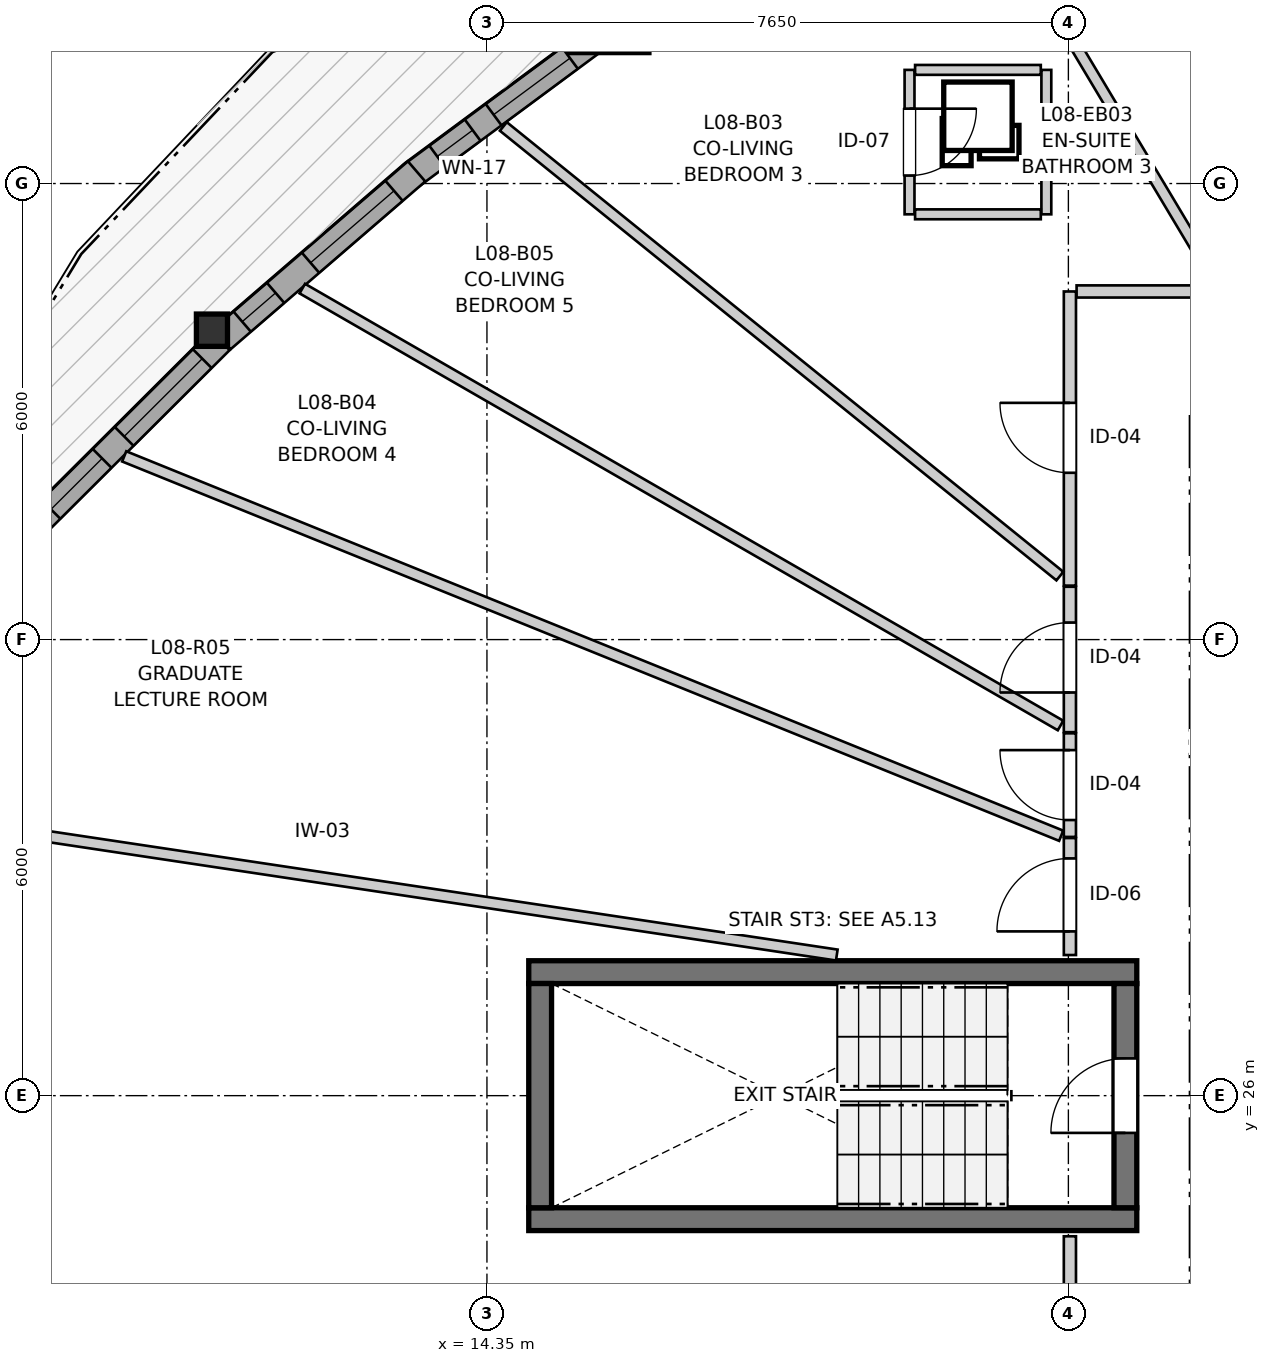
"""IFC4 building model, lengths in metres.
Left out: names, types, materials, properties, quantities, classifications, styles, units other than length and angle.
Written with IfcOpenShell. Run it as: python <this file> out.ifc"""

import sys

from ifc_helpers import new_model, si_unit, direction, frame, frame_2d, origin, origin_2d, place, context, subcontext, project, spatial, rectangle, i_section, extrude, source, transform, mapped, element, fill, save


model = new_model("IFC4")
c1 = context("Model", 3, precision=1e-05, world=origin(), true_north=direction((0.0, 1.0)))
c2 = subcontext(c1, "Body", "Model", "MODEL_VIEW")
j1 = project(units=[si_unit("LENGTHUNIT", "METRE"), si_unit("PLANEANGLEUNIT", "RADIAN")], contexts=[c1])
p1 = place(None, origin())
s1 = spatial("IfcSite", under=j1, at=p1, CompositionType="ELEMENT")
p2 = place(p1, origin())
s2 = spatial("IfcBuilding", under=s1, at=p2, CompositionType="ELEMENT")
p3 = place(p2, frame((0.0, 0.0, 30.2)))
s3 = spatial("IfcBuildingStorey", under=s2, at=p3, CompositionType="ELEMENT", Elevation=30.2)
for number, where, z_axis, x_axis in (
    (1, (14.9, 24.375, 0.0), (0.0, 0.0, 1.0), (1.0, 0.0, 0.0)),
    (2, (22.9, 27.625, 0.0), (0.0, 0.0, 1.0), (-1.0, 0.0, 0.0)),
):
    element("IfcWall", number, at=place(p3, frame(where, z_axis=z_axis, x_axis=x_axis)), inside=s3, PredefinedType="SHEAR", context=c2, shape_type="SweptSolid", body=[
        extrude(rectangle(XDim=8.0, YDim=0.3, at=frame_2d((4.0, 0.0))), origin(), (0.0, 0.0, 1.0), 2.935),
    ])
p4 = place(p3, frame((15.05, 27.475, 0.0), z_axis=(0.0, 0.0, 1.0), x_axis=(0.0, -1.0, 0.0)))
e3 = element("IfcWall", 3, at=p4, inside=s3, PredefinedType="SHEAR", context=c2, shape_type="SweptSolid", body=[
    extrude(rectangle(XDim=2.95, YDim=0.3, at=frame_2d((1.475, 0.0))), origin(), (0.0, 0.0, 1.0), 2.935),
])
p5 = place(p3, frame((22.75, 24.525, 0.0), z_axis=(0.0, 0.0, 1.0), x_axis=(0.0, 1.0, 0.0)))
e4 = element("IfcWall", 4, at=p5, inside=s3, PredefinedType="SHEAR", context=c2, shape_type="SweptSolid", body=[
    extrude(rectangle(XDim=2.95, YDim=0.3, at=frame_2d((1.475, 0.0))), origin(), (0.0, 0.0, 1.0), 2.935),
])
p6 = place(p5, frame((0.985, 0.0, 0.0)))
e5 = element("IfcOpeningElement", 5, at=p6, cuts=e4, PredefinedType="OPENING", context=c2, shape_type="SweptSolid", body=[
    extrude(rectangle(XDim=0.98, YDim=2.15, at=frame_2d((0.49, 1.075))), frame((0.0, 0.16, 0.0), z_axis=(0.0, -1.0, 0.0), x_axis=(1.0, 0.0, 0.0)), (0.0, 0.0, 1.0), 0.32),
])
m1 = source(origin(), c2, "Body", "SweptSolid", [
    extrude(rectangle(XDim=1.05, YDim=1.05, at=origin_2d()), origin(), (0.0, 0.0, 1.0), 2.935),
])
p7 = place(p3, frame((15.956, 40.247, 0.0), z_axis=(0.0, 0.0, 1.0), x_axis=(1.0, 0.0, 0.0)))
e6 = element("IfcColumn", 6, at=p7, inside=s3, PredefinedType="COLUMN", context=c2, shape_type="MappedRepresentation", body=[
    mapped(m1, transform((0.0, 0.0, 0.0), x_axis=(1.0, 0.0, 0.0), y_axis=(0.0, 1.0, 0.0), z_axis=(0.0, 0.0, 1.0), scale=1.0)),
])
m2 = source(origin(), c2, "Body", "SweptSolid", [
    extrude(i_section(OverallWidth=0.409, OverallDepth=0.425, WebThickness=0.03, FlangeThickness=0.048, FilletRadius=0.015, at=origin_2d()), origin(), (0.0, 0.0, 1.0), 2.935),
])
p8 = place(p3, frame((10.732, 36.07, 0.0), z_axis=(0.0, 0.0, 1.0), x_axis=(1.0, 0.0, 0.0)))
e7 = element("IfcColumn", 7, at=p8, inside=s3, PredefinedType="PILASTER", context=c2, shape_type="MappedRepresentation", body=[
    mapped(m2, transform((0.0, 0.0, 0.0), x_axis=(1.0, 0.0, 0.0), y_axis=(0.0, 1.0, 0.0), z_axis=(0.0, 0.0, 1.0), scale=1.0)),
])
p9 = place(p3, frame((15.819, 39.928, 0.0), z_axis=(0.0, 0.0, 1.0), x_axis=(-0.803825144674, -0.594865645999, 0.0)))
e8 = element("IfcWall", 8, at=p9, inside=s3, PredefinedType="SOLIDWALL", context=c2, shape_type="SweptSolid", body=[
    extrude(rectangle(XDim=3.066, YDim=0.35, at=frame_2d((1.533, 0.0))), origin(), (0.0, 0.0, 1.0), 2.415),
])
p10 = place(p9, frame((0.469, 0.0, 0.82)))
e9 = element("IfcOpeningElement", 9, at=p10, cuts=e8, PredefinedType="OPENING", context=c2, shape_type="SweptSolid", body=[
    extrude(rectangle(XDim=1.25, YDim=1.35, at=frame_2d((0.625, 0.675))), frame((0.0, 0.185, 0.0), z_axis=(0.0, -1.0, 0.0), x_axis=(1.0, 0.0, 0.0)), (0.0, 0.0, 1.0), 0.37),
])
p11 = place(p9, frame((2.062, 0.0, 0.82)))
e10 = element("IfcOpeningElement", 10, at=p11, cuts=e8, PredefinedType="OPENING", context=c2, shape_type="SweptSolid", body=[
    extrude(rectangle(XDim=0.58, YDim=1.35, at=frame_2d((0.29, 0.675))), frame((0.0, 0.185, 0.0), z_axis=(0.0, -1.0, 0.0), x_axis=(1.0, 0.0, 0.0)), (0.0, 0.0, 1.0), 0.37),
])
p12 = place(p3, frame((13.424, 38.16, 0.0), z_axis=(0.0, 0.0, 1.0), x_axis=(-0.757512075852, -0.652821150805, 0.0)))
e11 = element("IfcWall", 11, at=p12, inside=s3, PredefinedType="SOLIDWALL", context=c2, shape_type="SweptSolid", body=[
    extrude(rectangle(XDim=3.384, YDim=0.35, at=frame_2d((1.692, 0.0))), origin(), (0.0, 0.0, 1.0), 2.415),
])
p13 = place(p12, frame((0.392, 0.0, 0.82)))
e12 = element("IfcOpeningElement", 12, at=p13, cuts=e11, PredefinedType="OPENING", context=c2, shape_type="SweptSolid", body=[
    extrude(rectangle(XDim=1.45, YDim=1.25, at=frame_2d((0.725, 0.625))), frame((0.0, 0.185, 0.0), z_axis=(0.0, -1.0, 0.0), x_axis=(1.0, 0.0, 0.0)), (0.0, 0.0, 1.0), 0.37),
])
p14 = place(p12, frame((2.449, 0.0, 0.82)))
e13 = element("IfcOpeningElement", 13, at=p14, cuts=e11, PredefinedType="OPENING", context=c2, shape_type="SweptSolid", body=[
    extrude(rectangle(XDim=0.58, YDim=1.35, at=frame_2d((0.29, 0.675))), frame((0.0, 0.185, 0.0), z_axis=(0.0, -1.0, 0.0), x_axis=(1.0, 0.0, 0.0)), (0.0, 0.0, 1.0), 0.37),
])
p15 = place(p3, frame((10.841, 35.932, 0.0), z_axis=(0.0, 0.0, 1.0), x_axis=(-0.708383272101, -0.70582798174, 0.0)))
e14 = element("IfcWall", 14, at=p15, inside=s3, PredefinedType="SOLIDWALL", context=c2, shape_type="SweptSolid", body=[
    extrude(rectangle(XDim=3.439, YDim=0.35, at=frame_2d((1.72, 0.0))), origin(), (0.0, 0.0, 1.0), 2.415),
])
p16 = place(p15, frame((0.334, 0.0, 0.82)))
e15 = element("IfcOpeningElement", 15, at=p16, cuts=e14, PredefinedType="OPENING", context=c2, shape_type="SweptSolid", body=[
    extrude(rectangle(XDim=1.45, YDim=1.25, at=frame_2d((0.725, 0.625))), frame((0.0, 0.185, 0.0), z_axis=(0.0, -1.0, 0.0), x_axis=(1.0, 0.0, 0.0)), (0.0, 0.0, 1.0), 0.37),
])
p17 = place(p15, frame((2.194, 0.0, 0.82)))
e16 = element("IfcOpeningElement", 16, at=p17, cuts=e14, PredefinedType="OPENING", context=c2, shape_type="SweptSolid", body=[
    extrude(rectangle(XDim=0.95, YDim=1.35, at=frame_2d((0.475, 0.675))), frame((0.0, 0.185, 0.0), z_axis=(0.0, -1.0, 0.0), x_axis=(1.0, 0.0, 0.0)), (0.0, 0.0, 1.0), 0.37),
])
p18 = place(p3, frame((22.02, 16.883, 0.0), z_axis=(0.0, 0.0, 1.0), x_axis=(0.0, 1.0, 0.0)))
e17 = element("IfcWall", 17, at=p18, inside=s3, PredefinedType="PARTITIONING", context=c2, shape_type="SweptSolid", body=[
    extrude(rectangle(XDim=7.267, YDim=0.16, at=frame_2d((3.633, 0.0))), origin(), (0.0, 0.0, 1.0), 2.935),
])
p19 = place(p18, frame((2.845, 0.0, 0.0)))
e18 = element("IfcOpeningElement", 18, at=p19, cuts=e17, PredefinedType="OPENING", context=c2, shape_type="SweptSolid", body=[
    extrude(rectangle(XDim=1.3, YDim=2.1, at=frame_2d((0.65, 1.05))), frame((0.0, 0.09, 0.0), z_axis=(0.0, -1.0, 0.0), x_axis=(1.0, 0.0, 0.0)), (0.0, 0.0, 1.0), 0.18),
])
p20 = place(p3, frame((22.02, 32.71, 0.0), z_axis=(0.0, 0.0, 1.0), x_axis=(0.0, 1.0, 0.0)))
e19 = element("IfcWall", 19, at=p20, inside=s3, PredefinedType="PARTITIONING", context=c2, shape_type="SweptSolid", body=[
    extrude(rectangle(XDim=3.87, YDim=0.16, at=frame_2d((1.935, 0.0))), origin(), (0.0, 0.0, 1.0), 2.935),
])
p21 = place(p20, frame((1.485, 0.0, 0.0)))
e20 = element("IfcOpeningElement", 20, at=p21, cuts=e19, PredefinedType="OPENING", context=c2, shape_type="SweptSolid", body=[
    extrude(rectangle(XDim=0.92, YDim=2.1, at=frame_2d((0.46, 1.05))), frame((0.0, 0.09, 0.0), z_axis=(0.0, -1.0, 0.0), x_axis=(1.0, 0.0, 0.0)), (0.0, 0.0, 1.0), 0.18),
])
p22 = place(p3, frame((22.02, 30.782, 0.0), z_axis=(0.0, 0.0, 1.0), x_axis=(0.0, 1.0, 0.0)))
e21 = element("IfcWall", 21, at=p22, inside=s3, PredefinedType="PARTITIONING", context=c2, shape_type="SweptSolid", body=[
    extrude(rectangle(XDim=1.913, YDim=0.16, at=frame_2d((0.957, 0.0))), origin(), (0.0, 0.0, 1.0), 2.935),
])
p23 = place(p22, frame((0.522, 0.0, 0.0)))
e22 = element("IfcOpeningElement", 22, at=p23, cuts=e21, PredefinedType="OPENING", context=c2, shape_type="SweptSolid", body=[
    extrude(rectangle(XDim=0.92, YDim=2.1, at=frame_2d((0.46, 1.05))), frame((0.0, 0.09, 0.0), z_axis=(0.0, -1.0, 0.0), x_axis=(1.0, 0.0, 0.0)), (0.0, 0.0, 1.0), 0.18),
])
p24 = place(p3, frame((19.91, 39.495, 0.0), z_axis=(0.0, 0.0, 1.0), x_axis=(0.0, -1.0, 0.0)))
e23 = element("IfcWall", 23, at=p24, inside=s3, PredefinedType="PARTITIONING", context=c2, shape_type="SweptSolid", body=[
    extrude(rectangle(XDim=1.9, YDim=0.13, at=frame_2d((0.95, 0.0))), origin(), (0.0, 0.0, 1.0), 2.935),
])
p25 = place(p24, frame((0.51, 0.0, 0.0)))
e24 = element("IfcOpeningElement", 24, at=p25, cuts=e23, PredefinedType="OPENING", context=c2, shape_type="SweptSolid", body=[
    extrude(rectangle(XDim=0.88, YDim=2.05, at=frame_2d((0.44, 1.025))), frame((0.0, 0.075, 0.0), z_axis=(0.0, -1.0, 0.0), x_axis=(1.0, 0.0, 0.0)), (0.0, 0.0, 1.0), 0.15),
])
p26 = place(p3, frame((22.02, 27.85, 0.0), z_axis=(0.0, 0.0, 1.0), x_axis=(0.0, 1.0, 0.0)))
e25 = element("IfcWall", 25, at=p26, inside=s3, PredefinedType="PARTITIONING", context=c2, shape_type="SweptSolid", body=[
    extrude(rectangle(XDim=1.539, YDim=0.16, at=frame_2d((0.77, 0.0))), origin(), (0.0, 0.0, 1.0), 2.935),
])
p27 = place(p26, frame((0.311, 0.0, 0.0)))
e26 = element("IfcOpeningElement", 26, at=p27, cuts=e25, PredefinedType="OPENING", context=c2, shape_type="SweptSolid", body=[
    extrude(rectangle(XDim=0.96, YDim=2.1, at=frame_2d((0.48, 1.05))), frame((0.0, 0.09, 0.0), z_axis=(0.0, -1.0, 0.0), x_axis=(1.0, 0.0, 0.0)), (0.0, 0.0, 1.0), 0.18),
])
p28 = place(p3, frame((22.02, 29.404, 0.0), z_axis=(0.0, 0.0, 1.0), x_axis=(0.0, 1.0, 0.0)))
e27 = element("IfcWall", 27, at=p28, inside=s3, PredefinedType="PARTITIONING", context=c2, shape_type="SweptSolid", body=[
    extrude(rectangle(XDim=1.363, YDim=0.16, at=frame_2d((0.682, 0.0))), origin(), (0.0, 0.0, 1.0), 2.935),
])
p29 = place(p28, frame((0.222, 0.0, 0.0)))
e28 = element("IfcOpeningElement", 28, at=p29, cuts=e27, PredefinedType="OPENING", context=c2, shape_type="SweptSolid", body=[
    extrude(rectangle(XDim=0.92, YDim=2.1, at=frame_2d((0.46, 1.05))), frame((0.0, 0.09, 0.0), z_axis=(0.0, -1.0, 0.0), x_axis=(1.0, 0.0, 0.0)), (0.0, 0.0, 1.0), 0.18),
])
p30 = place(p3, frame((5.242, 29.91, 0.0), z_axis=(0.0, 0.0, 1.0), x_axis=(0.988899381561, -0.148586719285, 0.0)))
e29 = element("IfcWall", 29, at=p30, inside=s3, PredefinedType="PARTITIONING", context=c2, shape_type="SweptSolid", body=[
    extrude(rectangle(XDim=13.864, YDim=0.145, at=frame_2d((6.932, 0.0))), origin(), (0.0, 0.0, 1.0), 2.935),
])
p31 = place(p3, frame((9.577, 34.41, 0.0), z_axis=(0.0, 0.0, 1.0), x_axis=(0.926920362809, -0.375258099194, 0.0)))
e30 = element("IfcWall", 30, at=p31, inside=s3, PredefinedType="PARTITIONING", context=c2, shape_type="SweptSolid", body=[
    extrude(rectangle(XDim=13.3, YDim=0.145, at=frame_2d((6.65, 0.0))), origin(), (0.0, 0.0, 1.0), 2.935),
])
p32 = place(p3, frame((11.92, 36.618, 0.0), z_axis=(0.0, 0.0, 1.0), x_axis=(0.866473494239, -0.499223080177, 0.0)))
e31 = element("IfcWall", 31, at=p32, inside=s3, PredefinedType="PARTITIONING", context=c2, shape_type="SweptSolid", body=[
    extrude(rectangle(XDim=11.514, YDim=0.145, at=frame_2d((5.757, 0.0))), origin(), (0.0, 0.0, 1.0), 2.935),
])
p33 = place(p3, frame((14.566, 38.751, 0.0), z_axis=(0.0, 0.0, 1.0), x_axis=(0.777881688073, -0.628410756879, 0.0)))
e32 = element("IfcWall", 32, at=p33, inside=s3, PredefinedType="PARTITIONING", context=c2, shape_type="SweptSolid", body=[
    extrude(rectangle(XDim=9.413, YDim=0.145, at=frame_2d((4.707, 0.0))), origin(), (0.0, 0.0, 1.0), 2.935),
])
p34 = place(p3, frame((20.481, 42.51, 0.0), z_axis=(0.0, 0.0, 1.0), x_axis=(0.513067331262, -0.858348363773, 0.0)))
e33 = element("IfcWall", 33, at=p34, inside=s3, PredefinedType="PARTITIONING", context=c2, shape_type="SweptSolid", body=[
    extrude(rectangle(XDim=6.765, YDim=0.145, at=frame_2d((3.382, 0.0))), origin(), (0.0, 0.0, 1.0), 2.935),
])
p35 = place(p3, frame((22.108, 36.58, 0.0), z_axis=(0.0, 0.0, 1.0), x_axis=(1.0, 0.0, 0.0)))
e34 = element("IfcWall", 34, at=p35, inside=s3, PredefinedType="PARTITIONING", context=c2, shape_type="SweptSolid", body=[
    extrude(rectangle(XDim=1.746, YDim=0.16, at=frame_2d((0.873, 0.0))), origin(), (0.0, 0.0, 1.0), 2.543),
])
p36 = place(p3, frame((21.71, 37.595, 0.0), z_axis=(0.0, 0.0, 1.0), x_axis=(0.0, 1.0, 0.0)))
e35 = element("IfcWall", 35, at=p36, inside=s3, PredefinedType="PARTITIONING", context=c2, shape_type="SweptSolid", body=[
    extrude(rectangle(XDim=1.9, YDim=0.13, at=frame_2d((0.95, 0.0))), origin(), (0.0, 0.0, 1.0), 2.935),
])
for number, where, z_axis, x_axis in (
    (36, (19.983, 39.495, 0.0), (0.0, 0.0, 1.0), (1.0, 0.0, 0.0)),
    (37, (19.983, 37.595, 0.0), (0.0, 0.0, 1.0), (1.0, 0.0, 0.0)),
):
    element("IfcWall", number, at=place(p3, frame(where, z_axis=z_axis, x_axis=x_axis)), inside=s3, PredefinedType="PARTITIONING", context=c2, shape_type="SweptSolid", body=[
        extrude(rectangle(XDim=1.654, YDim=0.13, at=frame_2d((0.827, 0.0))), origin(), (0.0, 0.0, 1.0), 2.935),
    ])
m3 = source(origin(), c2, "Body", "SweptSolid", [
    extrude(rectangle(XDim=1.25, YDim=1.35, at=frame_2d((0.625, 0.675))), frame((0.0, 0.03, 0.0), z_axis=(0.0, -1.0, 0.0), x_axis=(1.0, 0.0, 0.0)), (0.0, 0.0, 1.0), 0.06),
])
p37 = place(p10, origin())
e38 = element("IfcWindow", 38, at=p37, inside=s3, PartitioningType="SINGLE_PANEL", PredefinedType="WINDOW", context=c2, shape_type="MappedRepresentation", body=[
    mapped(m3, transform((0.0, 0.0, 0.0), x_axis=(1.0, 0.0, 0.0), y_axis=(0.0, 1.0, 0.0), z_axis=(0.0, 0.0, 1.0), scale=1.0)),
])
fill(e9, e38)
m4 = source(origin(), c2, "Body", "SweptSolid", [
    extrude(rectangle(XDim=0.58, YDim=1.35, at=frame_2d((0.29, 0.675))), frame((0.0, 0.03, 0.0), z_axis=(0.0, -1.0, 0.0), x_axis=(1.0, 0.0, 0.0)), (0.0, 0.0, 1.0), 0.06),
])
p38 = place(p11, origin())
e39 = element("IfcWindow", 39, at=p38, inside=s3, PartitioningType="SINGLE_PANEL", PredefinedType="WINDOW", context=c2, shape_type="MappedRepresentation", body=[
    mapped(m4, transform((0.0, 0.0, 0.0), x_axis=(1.0, 0.0, 0.0), y_axis=(0.0, 1.0, 0.0), z_axis=(0.0, 0.0, 1.0), scale=1.0)),
])
fill(e10, e39)
m5 = source(origin(), c2, "Body", "SweptSolid", [
    extrude(rectangle(XDim=1.45, YDim=1.25, at=frame_2d((0.725, 0.625))), frame((0.0, 0.03, 0.0), z_axis=(0.0, -1.0, 0.0), x_axis=(1.0, 0.0, 0.0)), (0.0, 0.0, 1.0), 0.06),
])
p39 = place(p13, origin())
e40 = element("IfcWindow", 40, at=p39, inside=s3, PartitioningType="SINGLE_PANEL", PredefinedType="WINDOW", context=c2, shape_type="MappedRepresentation", body=[
    mapped(m5, transform((0.0, 0.0, 0.0), x_axis=(1.0, 0.0, 0.0), y_axis=(0.0, 1.0, 0.0), z_axis=(0.0, 0.0, 1.0), scale=1.0)),
])
fill(e12, e40)
p40 = place(p14, origin())
e41 = element("IfcWindow", 41, at=p40, inside=s3, PartitioningType="SINGLE_PANEL", PredefinedType="WINDOW", context=c2, shape_type="MappedRepresentation", body=[
    mapped(m4, transform((0.0, 0.0, 0.0), x_axis=(1.0, 0.0, 0.0), y_axis=(0.0, 1.0, 0.0), z_axis=(0.0, 0.0, 1.0), scale=1.0)),
])
fill(e13, e41)
p41 = place(p16, origin())
e42 = element("IfcWindow", 42, at=p41, inside=s3, PartitioningType="SINGLE_PANEL", PredefinedType="WINDOW", context=c2, shape_type="MappedRepresentation", body=[
    mapped(m5, transform((0.0, 0.0, 0.0), x_axis=(1.0, 0.0, 0.0), y_axis=(0.0, 1.0, 0.0), z_axis=(0.0, 0.0, 1.0), scale=1.0)),
])
fill(e15, e42)
m6 = source(origin(), c2, "Body", "SweptSolid", [
    extrude(rectangle(XDim=0.95, YDim=1.35, at=frame_2d((0.475, 0.675))), frame((0.0, 0.03, 0.0), z_axis=(0.0, -1.0, 0.0), x_axis=(1.0, 0.0, 0.0)), (0.0, 0.0, 1.0), 0.06),
])
p42 = place(p17, origin())
e43 = element("IfcWindow", 43, at=p42, inside=s3, PartitioningType="SINGLE_PANEL", PredefinedType="WINDOW", context=c2, shape_type="MappedRepresentation", body=[
    mapped(m6, transform((0.0, 0.0, 0.0), x_axis=(1.0, 0.0, 0.0), y_axis=(0.0, 1.0, 0.0), z_axis=(0.0, 0.0, 1.0), scale=1.0)),
])
fill(e16, e43)
m7 = source(origin(), c2, "Body", "SweptSolid", [
    extrude(rectangle(XDim=0.98, YDim=2.15, at=frame_2d((0.49, 1.075))), frame((0.0, 0.025, 0.0), z_axis=(0.0, -1.0, 0.0), x_axis=(1.0, 0.0, 0.0)), (0.0, 0.0, 1.0), 0.05),
])
p43 = place(p6, origin())
e44 = element("IfcDoor", 44, at=p43, inside=s3, OperationType="SINGLE_SWING_LEFT", PredefinedType="DOOR", context=c2, shape_type="MappedRepresentation", body=[
    mapped(m7, transform((0.0, 0.0, 0.0), x_axis=(1.0, 0.0, 0.0), y_axis=(0.0, 1.0, 0.0), z_axis=(0.0, 0.0, 1.0), scale=1.0)),
])
fill(e5, e44)
m8 = source(origin(), c2, "Body", "SweptSolid", [
    extrude(rectangle(XDim=0.92, YDim=2.1, at=frame_2d((0.46, 1.05))), frame((0.0, 0.025, 0.0), z_axis=(0.0, -1.0, 0.0), x_axis=(1.0, 0.0, 0.0)), (0.0, 0.0, 1.0), 0.05),
])
p44 = place(p21, origin())
e45 = element("IfcDoor", 45, at=p44, inside=s3, OperationType="SINGLE_SWING_RIGHT", PredefinedType="DOOR", context=c2, shape_type="MappedRepresentation", body=[
    mapped(m8, transform((0.0, 0.0, 0.0), x_axis=(1.0, 0.0, 0.0), y_axis=(0.0, 1.0, 0.0), z_axis=(0.0, 0.0, 1.0), scale=1.0)),
])
fill(e20, e45)
p45 = place(p23, origin())
e46 = element("IfcDoor", 46, at=p45, inside=s3, OperationType="SINGLE_SWING_LEFT", PredefinedType="DOOR", context=c2, shape_type="MappedRepresentation", body=[
    mapped(m8, transform((0.0, 0.0, 0.0), x_axis=(1.0, 0.0, 0.0), y_axis=(0.0, 1.0, 0.0), z_axis=(0.0, 0.0, 1.0), scale=1.0)),
])
fill(e22, e46)
m9 = source(origin(), c2, "Body", "SweptSolid", [
    extrude(rectangle(XDim=0.88, YDim=2.05, at=frame_2d((0.44, 1.025))), frame((0.0, 0.025, 0.0), z_axis=(0.0, -1.0, 0.0), x_axis=(1.0, 0.0, 0.0)), (0.0, 0.0, 1.0), 0.05),
])
p46 = place(p25, origin())
e47 = element("IfcDoor", 47, at=p46, inside=s3, OperationType="SINGLE_SWING_LEFT", PredefinedType="DOOR", context=c2, shape_type="MappedRepresentation", body=[
    mapped(m9, transform((0.0, 0.0, 0.0), x_axis=(1.0, 0.0, 0.0), y_axis=(0.0, 1.0, 0.0), z_axis=(0.0, 0.0, 1.0), scale=1.0)),
])
fill(e24, e47)
m10 = source(origin(), c2, "Body", "SweptSolid", [
    extrude(rectangle(XDim=0.96, YDim=2.1, at=frame_2d((0.48, 1.05))), frame((0.0, 0.025, 0.0), z_axis=(0.0, -1.0, 0.0), x_axis=(1.0, 0.0, 0.0)), (0.0, 0.0, 1.0), 0.05),
])
p47 = place(p27, origin())
e48 = element("IfcDoor", 48, at=p47, inside=s3, OperationType="SINGLE_SWING_LEFT", PredefinedType="DOOR", context=c2, shape_type="MappedRepresentation", body=[
    mapped(m10, transform((0.0, 0.0, 0.0), x_axis=(1.0, 0.0, 0.0), y_axis=(0.0, 1.0, 0.0), z_axis=(0.0, 0.0, 1.0), scale=1.0)),
])
fill(e26, e48)
p48 = place(p29, origin())
e49 = element("IfcDoor", 49, at=p48, inside=s3, OperationType="SINGLE_SWING_RIGHT", PredefinedType="DOOR", context=c2, shape_type="MappedRepresentation", body=[
    mapped(m8, transform((0.0, 0.0, 0.0), x_axis=(1.0, 0.0, 0.0), y_axis=(0.0, 1.0, 0.0), z_axis=(0.0, 0.0, 1.0), scale=1.0)),
])
fill(e28, e49)
save(model, sys.argv[1])
